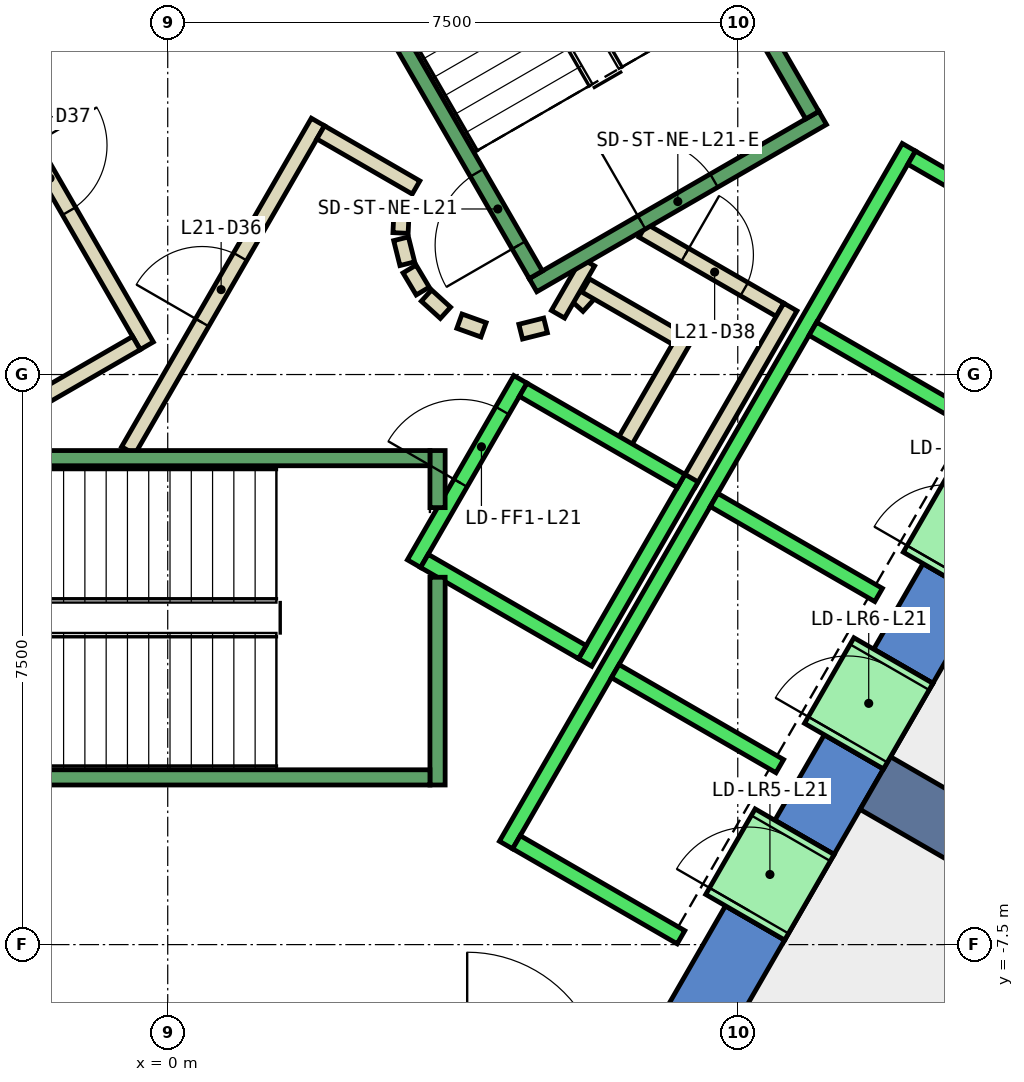
"""IFC4 building model, lengths in metres.
Left out: names, types, materials, properties, quantities, classifications, styles, units other than length and angle.
Written with IfcOpenShell. Run it as: python <this file> out.ifc"""

import sys

from ifc_helpers import new_model, si_unit, direction, frame, frame_2d, origin, place, context, subcontext, project, spatial, polyline, rectangle, outline, extrude, element, fill, save


model = new_model("IFC4")
c1 = context("Model", 3, precision=1e-05, world=origin(), true_north=direction((0.0, 1.0)))
c2 = subcontext(c1, "Body", "Model", "MODEL_VIEW")
j1 = project(units=[si_unit("LENGTHUNIT", "METRE"), si_unit("PLANEANGLEUNIT", "RADIAN")], contexts=[c1])
p1 = place(None, origin())
s1 = spatial("IfcSite", under=j1, at=p1, CompositionType="ELEMENT")
p2 = place(p1, origin())
s2 = spatial("IfcBuilding", under=s1, at=p2, CompositionType="ELEMENT")
p3 = place(p2, frame((0.0, 0.0, 99.2)))
s3 = spatial("IfcBuildingStorey", under=s2, at=p3, CompositionType="ELEMENT", Elevation=99.2)
p4 = place(p3, frame((0.0, 0.0, -0.4)))
e1 = element("IfcWall", 1, at=p4, inside=s3, PredefinedType="SHEAR", context=c2, shape_type="SweptSolid", body=[
    extrude(outline(polyline([(8.517, 11.748), (7.738, 11.298), (12.817, 2.5), (13.856, 2.5), (8.517, 11.748)])), origin(), (0.0, 0.0, 1.0), 4.2),
])
p5 = place(p3, frame((0.0, 0.0, -0.4)))
e2 = element("IfcWall", 2, at=p5, inside=s3, PredefinedType="SHEAR", context=c2, shape_type="SweptSolid", body=[
    extrude(outline(polyline([(8.117, -7.44), (7.338, -6.99), (6.409, -8.6), (6.928, -9.5), (8.117, -7.44)])), origin(), (0.0, 0.0, 1.0), 4.2),
])
p6 = place(p3, frame((0.0, 0.0, -0.4)))
e3 = element("IfcWall", 3, at=p6, inside=s3, PredefinedType="SHEAR", context=c2, shape_type="SweptSolid", body=[
    extrude(outline(polyline([(9.417, -5.189), (8.638, -4.739), (7.988, -5.864), (8.767, -6.314), (9.417, -5.189)])), origin(), (0.0, 0.0, 1.0), 4.2),
])
p7 = place(p3, frame((0.0, 0.0, -0.4)))
e4 = element("IfcWall", 4, at=p7, inside=s3, PredefinedType="SHEAR", context=c2, shape_type="SweptSolid", body=[
    extrude(outline(polyline([(10.717, -2.937), (9.938, -2.487), (9.288, -3.613), (10.067, -4.063), (10.717, -2.937)])), origin(), (0.0, 0.0, 1.0), 4.2),
])
p8 = place(p3, frame((0.0, 0.0, 3.6)))
e5 = element("IfcWall", 5, at=p8, inside=s3, PredefinedType="SHEAR", context=c2, shape_type="SweptSolid", body=[
    extrude(outline(polyline([(8.767, -6.314), (7.988, -5.864), (7.338, -6.99), (8.117, -7.44), (8.767, -6.314)])), origin(), (0.0, 0.0, 1.0), 0.2),
])
p9 = place(p3, frame((0.0, 0.0, 3.6)))
e6 = element("IfcWall", 6, at=p9, inside=s3, PredefinedType="SHEAR", context=c2, shape_type="SweptSolid", body=[
    extrude(outline(polyline([(10.067, -4.063), (9.288, -3.613), (8.638, -4.739), (9.417, -5.189), (10.067, -4.063)])), origin(), (0.0, 0.0, 1.0), 0.2),
])
p10 = place(p3, frame((0.0, 0.0, 3.6)))
e7 = element("IfcWall", 7, at=p10, inside=s3, PredefinedType="SHEAR", context=c2, shape_type="SweptSolid", body=[
    extrude(outline(polyline([(11.367, -1.811), (10.588, -1.361), (9.938, -2.487), (10.717, -2.937), (11.367, -1.811)])), origin(), (0.0, 0.0, 1.0), 0.2),
])
p11 = place(p3, frame((9.31, -5.375, -0.4), z_axis=(0.0, 0.0, 1.0), x_axis=(0.866017533419, -0.500013631625, 0.0)))
e8 = element("IfcWall", 8, at=p11, inside=s3, PredefinedType="SHEAR", context=c2, shape_type="SweptSolid", body=[
    extrude(rectangle(XDim=9.0, YDim=0.8, at=frame_2d((4.5, 0.0))), origin(), (0.0, 0.0, 1.0), 4.2),
])
p12 = place(p3, frame((5.39, 0.898, 0.0), z_axis=(0.0, 0.0, 1.0), x_axis=(0.673828488714, 0.738887791073, 0.0)))
e9 = element("IfcWall", 9, at=p12, inside=s3, PredefinedType="PARTITIONING", context=c2, shape_type="SweptSolid", body=[
    extrude(rectangle(XDim=0.263, YDim=0.2, at=frame_2d((0.131, 0.0))), origin(), (0.0, 0.0, 1.0), 3.8),
])
p13 = place(p3, frame((5.499, 1.172, 0.0), z_axis=(0.0, 0.0, 1.0), x_axis=(0.866333505267, -0.499465972466, 0.0)))
e10 = element("IfcWall", 10, at=p13, inside=s3, PredefinedType="PARTITIONING", context=c2, shape_type="SweptSolid", body=[
    extrude(rectangle(XDim=1.374, YDim=0.2, at=frame_2d((0.687, 0.0))), origin(), (0.0, 0.0, 1.0), 3.8),
])
p14 = place(p3, frame((6.826, 0.522, 0.0), z_axis=(0.0, 0.0, 1.0), x_axis=(-0.500016722714, -0.866015748706, 0.0)))
e11 = element("IfcWall", 11, at=p14, inside=s3, PredefinedType="PARTITIONING", context=c2, shape_type="SweptSolid", body=[
    extrude(rectangle(XDim=1.7, YDim=0.2, at=frame_2d((0.85, 0.0))), origin(), (0.0, 0.0, 1.0), 3.8),
])
p15 = place(p3, frame((6.25, 1.894, 0.0), z_axis=(0.0, 0.0, 1.0), x_axis=(0.866043184279, -0.499969202016, 0.0)))
e12 = element("IfcWall", 12, at=p15, inside=s3, PredefinedType="PARTITIONING", context=c2, shape_type="SweptSolid", body=[
    extrude(rectangle(XDim=2.084, YDim=0.2, at=frame_2d((1.042, 0.0))), origin(), (0.0, 0.0, 1.0), 3.8),
])
p16 = place(p15, frame((0.642, 0.0, 0.0)))
e13 = element("IfcOpeningElement", 13, at=p16, cuts=e12, PredefinedType="OPENING", context=c2, shape_type="SweptSolid", body=[
    extrude(rectangle(XDim=0.9, YDim=2.1, at=frame_2d((0.45, 1.05))), frame((0.0, 0.11, 0.0), z_axis=(0.0, -1.0, 0.0), x_axis=(1.0, 0.0, 0.0)), (0.0, 0.0, 1.0), 0.22),
])
p17 = place(p3, frame((8.192, 0.888, 0.0), z_axis=(0.0, 0.0, 1.0), x_axis=(-0.499940625693, -0.866059680843, 0.0)))
e14 = element("IfcWall", 14, at=p17, inside=s3, PredefinedType="PARTITIONING", context=c2, shape_type="SweptSolid", body=[
    extrude(rectangle(XDim=2.68, YDim=0.2, at=frame_2d((1.34, 0.0))), origin(), (0.0, 0.0, 1.0), 3.8),
])
p18 = place(p3, frame((5.135, 0.793, 0.0), z_axis=(0.0, 0.0, 1.0), x_axis=(0.499526442893, 0.866298639529, 0.0)))
e15 = element("IfcWall", 15, at=p18, inside=s3, PredefinedType="PARTITIONING", context=c2, shape_type="SweptSolid", body=[
    extrude(rectangle(XDim=0.791, YDim=0.2, at=frame_2d((0.396, 0.0))), origin(), (0.0, 0.0, 1.0), 3.8),
])
p19 = place(p3, frame((-0.52, -1.0, 0.0), z_axis=(0.0, 0.0, 1.0), x_axis=(0.50011622646, 0.865958290007, 0.0)))
e16 = element("IfcWall", 16, at=p19, inside=s3, PredefinedType="PARTITIONING", context=c2, shape_type="SweptSolid", body=[
    extrude(rectangle(XDim=4.991, YDim=0.2, at=frame_2d((2.496, 0.0))), origin(), (0.0, 0.0, 1.0), 3.8),
])
p20 = place(p19, frame((1.945, 0.0, 0.0)))
e17 = element("IfcOpeningElement", 17, at=p20, cuts=e16, PredefinedType="OPENING", context=c2, shape_type="SweptSolid", body=[
    extrude(rectangle(XDim=1.0, YDim=2.1, at=frame_2d((0.5, 1.05))), frame((0.0, 0.11, 0.0), z_axis=(0.0, -1.0, 0.0), x_axis=(1.0, 0.0, 0.0)), (0.0, 0.0, 1.0), 0.22),
])
p21 = place(p3, frame((2.012, 3.186, 0.0), z_axis=(0.0, 0.0, 1.0), x_axis=(0.865891012941, -0.500232699559, 0.0)))
e18 = element("IfcWall", 18, at=p21, inside=s3, PredefinedType="PARTITIONING", context=c2, shape_type="SweptSolid", body=[
    extrude(rectangle(XDim=1.449, YDim=0.2, at=frame_2d((0.725, 0.0))), origin(), (0.0, 0.0, 1.0), 3.8),
])
p22 = place(p3, frame((3.079, 2.199, 0.0), z_axis=(0.0, 0.0, 1.0), x_axis=(-0.047771483479, -0.998858290933, 0.0)))
e19 = element("IfcWall", 19, at=p22, inside=s3, PredefinedType="PARTITIONING", context=c2, shape_type="SweptSolid", body=[
    extrude(rectangle(XDim=0.337, YDim=0.2, at=frame_2d((0.169, 0.0))), origin(), (0.0, 0.0, 1.0), 3.8),
])
p23 = place(p3, frame((3.07, 1.786, 0.0), z_axis=(0.0, 0.0, 1.0), x_axis=(0.242705583207, -0.970099994784, 0.0)))
e20 = element("IfcWall", 20, at=p23, inside=s3, PredefinedType="PARTITIONING", context=c2, shape_type="SweptSolid", body=[
    extrude(rectangle(XDim=0.338, YDim=0.2, at=frame_2d((0.169, 0.0))), origin(), (0.0, 0.0, 1.0), 3.8),
])
for number, where, z_axis, x_axis in (
    (21, (3.182, 1.388, 0.0), (0.0, 0.0, 1.0), (0.512, -0.859, 0.0)),
    (22, (3.404, 1.039, 0.0), (0.0, 0.0, 1.0), (0.74, -0.672, 0.0)),
):
    element("IfcWall", number, at=place(p3, frame(where, z_axis=z_axis, x_axis=x_axis)), inside=s3, PredefinedType="PARTITIONING", context=c2, shape_type="SweptSolid", body=[
        extrude(rectangle(XDim=0.338, YDim=0.2, at=frame_2d((0.169, 0.0))), origin(), (0.0, 0.0, 1.0), 3.8),
    ])
p24 = place(p3, frame((3.838, 0.702, 0.0), z_axis=(0.0, 0.0, 1.0), x_axis=(0.941035081519, -0.338308993895, 0.0)))
e23 = element("IfcWall", 23, at=p24, inside=s3, PredefinedType="PARTITIONING", context=c2, shape_type="SweptSolid", body=[
    extrude(rectangle(XDim=0.337, YDim=0.2, at=frame_2d((0.168, 0.0))), origin(), (0.0, 0.0, 1.0), 3.8),
])
p25 = place(p3, frame((4.644, 0.564, 0.0), z_axis=(0.0, 0.0, 1.0), x_axis=(0.969929076366, 0.243387729394, 0.0)))
e24 = element("IfcWall", 24, at=p25, inside=s3, PredefinedType="PARTITIONING", context=c2, shape_type="SweptSolid", body=[
    extrude(rectangle(XDim=0.337, YDim=0.2, at=frame_2d((0.168, 0.0))), origin(), (0.0, 0.0, 1.0), 3.8),
])
p26 = place(p3, frame((-2.771, 4.7, 0.0), z_axis=(0.0, 0.0, 1.0), x_axis=(0.499969479948, -0.866043023828, 0.0)))
e25 = element("IfcWall", 25, at=p26, inside=s3, PredefinedType="PARTITIONING", context=c2, shape_type="SweptSolid", body=[
    extrude(rectangle(XDim=4.99, YDim=0.2, at=frame_2d((2.495, 0.0))), origin(), (0.0, 0.0, 1.0), 3.8),
])
p27 = place(p26, frame((1.945, 0.0, 0.0)))
e26 = element("IfcOpeningElement", 26, at=p27, cuts=e25, PredefinedType="OPENING", context=c2, shape_type="SweptSolid", body=[
    extrude(rectangle(XDim=1.0, YDim=2.1, at=frame_2d((0.5, 1.05))), frame((0.0, 0.11, 0.0), z_axis=(0.0, -1.0, 0.0), x_axis=(1.0, 0.0, 0.0)), (0.0, 0.0, 1.0), 0.22),
])
p28 = place(p3, frame((-0.412, 0.414, 0.0), z_axis=(0.0, 0.0, 1.0), x_axis=(-0.866017369001, -0.500013916395, 0.0)))
e27 = element("IfcWall", 27, at=p28, inside=s3, PredefinedType="PARTITIONING", context=c2, shape_type="SweptSolid", body=[
    extrude(rectangle(XDim=1.45, YDim=0.2, at=frame_2d((0.725, 0.0))), origin(), (0.0, 0.0, 1.0), 3.8),
])
p29 = place(p3, frame((12.401, -7.621, 0.0), z_axis=(0.0, 0.0, 1.0), x_axis=(-0.499983724212, -0.866034800411, 0.0)))
e28 = element("IfcWall", 28, at=p29, inside=s3, PredefinedType="PARTITIONING", context=c2, shape_type="SweptSolid", body=[
    extrude(rectangle(XDim=9.302, YDim=0.2, at=frame_2d((4.651, 0.0))), origin(), (0.0, 0.0, 1.0), 3.8),
])
p30 = place(p3, frame((3.24, -2.488, 0.0), z_axis=(0.0, 0.0, 1.0), x_axis=(0.49994636267, 0.866056369097, 0.0)))
e29 = element("IfcWall", 29, at=p30, inside=s3, PredefinedType="STANDARD", context=c2, shape_type="SweptSolid", body=[
    extrude(rectangle(XDim=2.8, YDim=0.2, at=frame_2d((1.4, 0.0))), origin(), (0.0, 0.0, 1.0), 3.8),
])
p31 = place(p30, frame((1.225, 0.0, 0.0)))
e30 = element("IfcOpeningElement", 30, at=p31, cuts=e29, PredefinedType="OPENING", context=c2, shape_type="SweptSolid", body=[
    extrude(rectangle(XDim=1.1, YDim=2.1, at=frame_2d((0.55, 1.05))), frame((0.0, 0.11, 0.0), z_axis=(0.0, -1.0, 0.0), x_axis=(1.0, 0.0, 0.0)), (0.0, 0.0, 1.0), 0.22),
])
p32 = place(p3, frame((5.492, -3.788, 0.0), z_axis=(0.0, 0.0, 1.0), x_axis=(0.500011755427, 0.866018616679, 0.0)))
e31 = element("IfcWall", 31, at=p32, inside=s3, PredefinedType="STANDARD", context=c2, shape_type="SweptSolid", body=[
    extrude(rectangle(XDim=2.8, YDim=0.2, at=frame_2d((1.4, 0.0))), origin(), (0.0, 0.0, 1.0), 3.8),
])
p33 = place(p3, frame((3.377, -2.452, 0.0), z_axis=(0.0, 0.0, 1.0), x_axis=(0.865955154139, -0.50012165622, 0.0)))
e32 = element("IfcWall", 32, at=p33, inside=s3, PredefinedType="STANDARD", context=c2, shape_type="SweptSolid", body=[
    extrude(rectangle(XDim=2.4, YDim=0.2, at=frame_2d((1.2, 0.0))), origin(), (0.0, 0.0, 1.0), 3.8),
])
p34 = place(p3, frame((4.677, -0.2, 0.0), z_axis=(0.0, 0.0, 1.0), x_axis=(0.865973769406, -0.500089422704, 0.0)))
e33 = element("IfcWall", 33, at=p34, inside=s3, PredefinedType="STANDARD", context=c2, shape_type="SweptSolid", body=[
    extrude(rectangle(XDim=2.399, YDim=0.2, at=frame_2d((1.2, 0.0))), origin(), (0.0, 0.0, 1.0), 3.8),
])
p35 = place(p3, frame((4.451, -6.19, 0.0), z_axis=(0.0, 0.0, 1.0), x_axis=(0.50000090737, 0.866024879913, 0.0)))
e34 = element("IfcWall", 34, at=p35, inside=s3, PredefinedType="STANDARD", context=c2, shape_type="SweptSolid", body=[
    extrude(rectangle(XDim=10.6, YDim=0.2, at=frame_2d((5.3, 0.0))), origin(), (0.0, 0.0, 1.0), 3.8),
])
for number, where, z_axis, x_axis in (
    (35, (4.588, -6.153, 0.0), (0.0, 0.0, 1.0), (0.866, -0.5, 0.0)),
    (36, (5.888, -3.902, 0.0), (0.0, 0.0, 1.0), (0.866, -0.5, 0.0)),
    (37, (7.188, -1.65, 0.0), (0.0, 0.0, 1.0), (0.866, -0.5, 0.0)),
    (38, (8.488, 0.602, 0.0), (0.0, 0.0, 1.0), (0.866, -0.5, 0.0)),
):
    element("IfcWall", number, at=place(p3, frame(where, z_axis=z_axis, x_axis=x_axis)), inside=s3, PredefinedType="STANDARD", context=c2, shape_type="SweptSolid", body=[
        extrude(rectangle(XDim=2.5, YDim=0.2, at=frame_2d((1.25, 0.0))), origin(), (0.0, 0.0, 1.0), 3.8),
    ])
p36 = place(p3, frame((9.788, 2.853, 0.0), z_axis=(0.0, 0.0, 1.0), x_axis=(0.865998541277, -0.500046524342, 0.0)))
e39 = element("IfcWall", 39, at=p36, inside=s3, PredefinedType="STANDARD", context=c2, shape_type="SweptSolid", body=[
    extrude(rectangle(XDim=2.5, YDim=0.2, at=frame_2d((1.25, 0.0))), origin(), (0.0, 0.0, 1.0), 3.8),
])
p37 = place(p3, frame((7.598, -7.14, 0.0), z_axis=(0.0, 0.0, 1.0), x_axis=(0.500362116554, 0.865816234728, 0.0)))
e40 = element("IfcWall", 40, at=p37, inside=s3, PredefinedType="STANDARD", context=c2, shape_type="SweptSolid", body=[
    extrude(rectangle(XDim=1.299, YDim=1.2, at=frame_2d((0.65, 0.0))), origin(), (0.0, 0.0, 1.0), 2.4),
])
p38 = place(p37, frame((0.1, 0.0, 0.0)))
e41 = element("IfcOpeningElement", 41, at=p38, cuts=e40, PredefinedType="OPENING", context=c2, shape_type="SweptSolid", body=[
    extrude(rectangle(XDim=1.1, YDim=2.3, at=frame_2d((0.55, 1.15))), frame((0.0, 0.61, 0.0), z_axis=(0.0, -1.0, 0.0), x_axis=(1.0, 0.0, 0.0)), (0.0, 0.0, 1.0), 1.22),
])
p39 = place(p3, frame((8.898, -4.889, 0.0), z_axis=(0.0, 0.0, 1.0), x_axis=(0.500036693733, 0.866004217611, 0.0)))
e42 = element("IfcWall", 42, at=p39, inside=s3, PredefinedType="STANDARD", context=c2, shape_type="SweptSolid", body=[
    extrude(rectangle(XDim=1.3, YDim=1.2, at=frame_2d((0.65, 0.0))), origin(), (0.0, 0.0, 1.0), 2.4),
])
p40 = place(p39, frame((0.1, 0.0, 0.0)))
e43 = element("IfcOpeningElement", 43, at=p40, cuts=e42, PredefinedType="OPENING", context=c2, shape_type="SweptSolid", body=[
    extrude(rectangle(XDim=1.1, YDim=2.3, at=frame_2d((0.55, 1.15))), frame((0.0, 0.61, 0.0), z_axis=(0.0, -1.0, 0.0), x_axis=(1.0, 0.0, 0.0)), (0.0, 0.0, 1.0), 1.22),
])
p41 = place(p3, frame((10.198, -2.637, 0.0), z_axis=(0.0, 0.0, 1.0), x_axis=(0.49989585183, 0.866085525409, 0.0)))
e44 = element("IfcWall", 44, at=p41, inside=s3, PredefinedType="STANDARD", context=c2, shape_type="SweptSolid", body=[
    extrude(rectangle(XDim=1.3, YDim=1.2, at=frame_2d((0.65, 0.0))), origin(), (0.0, 0.0, 1.0), 2.4),
])
p42 = place(p41, frame((0.1, 0.0, 0.0)))
e45 = element("IfcOpeningElement", 45, at=p42, cuts=e44, PredefinedType="OPENING", context=c2, shape_type="SweptSolid", body=[
    extrude(rectangle(XDim=1.1, YDim=2.3, at=frame_2d((0.55, 1.15))), frame((0.0, 0.61, 0.0), z_axis=(0.0, -1.0, 0.0), x_axis=(1.0, 0.0, 0.0)), (0.0, 0.0, 1.0), 1.22),
])
p43 = place(p3, frame((3.55, -2.667, 0.0), z_axis=(0.0, 0.0, 1.0), x_axis=(0.0, -1.0, 0.0)))
e46 = element("IfcWall", 46, at=p43, inside=s3, PredefinedType="STANDARD", context=c2, shape_type="SweptSolid", body=[
    extrude(rectangle(XDim=2.733, YDim=0.2, at=frame_2d((1.366, 0.0))), origin(), (0.0, 0.0, 1.0), 3.8),
])
p44 = place(p3, frame((3.55, -1.0, 0.0), z_axis=(0.0, 0.0, 1.0), x_axis=(0.0, -1.0, 0.0)))
e47 = element("IfcWall", 47, at=p44, inside=s3, PredefinedType="STANDARD", context=c2, shape_type="SweptSolid", body=[
    extrude(rectangle(XDim=0.751, YDim=0.2, at=frame_2d((0.375, 0.0))), origin(), (0.0, 0.0, 1.0), 3.8),
])
p45 = place(p3, frame((-3.45, -1.1, 0.0), z_axis=(0.0, 0.0, 1.0), x_axis=(1.0, 0.0, 0.0)))
e48 = element("IfcWall", 48, at=p45, inside=s3, PredefinedType="STANDARD", context=c2, shape_type="SweptSolid", body=[
    extrude(rectangle(XDim=6.9, YDim=0.2, at=frame_2d((3.45, 0.0))), origin(), (0.0, 0.0, 1.0), 3.8),
])
p46 = place(p45, frame((0.45, 0.0, 0.0)))
e49 = element("IfcOpeningElement", 49, at=p46, cuts=e48, PredefinedType="OPENING", context=c2, shape_type="SweptSolid", body=[
    extrude(rectangle(XDim=1.1, YDim=2.2, at=frame_2d((0.55, 1.1))), frame((0.0, 0.11, 0.0), z_axis=(0.0, -1.0, 0.0), x_axis=(1.0, 0.0, 0.0)), (0.0, 0.0, 1.0), 0.22),
])
p47 = place(p3, frame((-3.45, -5.3, 0.0), z_axis=(0.0, 0.0, 1.0), x_axis=(1.0, 0.0, 0.0)))
e50 = element("IfcWall", 50, at=p47, inside=s3, PredefinedType="STANDARD", context=c2, shape_type="SweptSolid", body=[
    extrude(rectangle(XDim=6.9, YDim=0.2, at=frame_2d((3.45, 0.0))), origin(), (0.0, 0.0, 1.0), 3.8),
])
p48 = place(p3, frame((4.806, 1.176, 0.0), z_axis=(0.0, 0.0, 1.0), x_axis=(0.866059941101, 0.499940174841, 0.0)))
e51 = element("IfcWall", 51, at=p48, inside=s3, PredefinedType="STANDARD", context=c2, shape_type="SweptSolid", body=[
    extrude(rectangle(XDim=4.4, YDim=0.2, at=frame_2d((2.2, 0.0))), origin(), (0.0, 0.0, 1.0), 3.8),
])
p49 = place(p48, frame((1.65, 0.0, 0.0)))
e52 = element("IfcOpeningElement", 52, at=p49, cuts=e51, PredefinedType="OPENING", context=c2, shape_type="SweptSolid", body=[
    extrude(rectangle(XDim=1.1, YDim=2.2, at=frame_2d((0.55, 1.1))), frame((0.0, 0.11, 0.0), z_axis=(0.0, -1.0, 0.0), x_axis=(1.0, 0.0, 0.0)), (0.0, 0.0, 1.0), 0.22),
])
p50 = place(p3, frame((4.843, 1.312, 0.0), z_axis=(0.0, 0.0, 1.0), x_axis=(-0.499963383562, 0.866046543262, 0.0)))
e53 = element("IfcWall", 53, at=p50, inside=s3, PredefinedType="STANDARD", context=c2, shape_type="SweptSolid", body=[
    extrude(rectangle(XDim=6.9, YDim=0.2, at=frame_2d((3.45, 0.0))), origin(), (0.0, 0.0, 1.0), 3.8),
])
p51 = place(p50, frame((0.45, 0.0, 0.0)))
e54 = element("IfcOpeningElement", 54, at=p51, cuts=e53, PredefinedType="OPENING", context=c2, shape_type="SweptSolid", body=[
    extrude(rectangle(XDim=1.1, YDim=2.2, at=frame_2d((0.55, 1.1))), frame((0.0, 0.11, 0.0), z_axis=(0.0, -1.0, 0.0), x_axis=(1.0, 0.0, 0.0)), (0.0, 0.0, 1.0), 0.22),
])
p52 = place(p3, frame((8.48, 3.412, 0.0), z_axis=(0.0, 0.0, 1.0), x_axis=(-0.499978703459, 0.866037698999, 0.0)))
e55 = element("IfcWall", 55, at=p52, inside=s3, PredefinedType="STANDARD", context=c2, shape_type="SweptSolid", body=[
    extrude(rectangle(XDim=6.9, YDim=0.2, at=frame_2d((3.45, 0.0))), origin(), (0.0, 0.0, 1.0), 3.8),
])
p53 = place(p3, frame((-1.393, 7.288, 0.0), z_axis=(0.0, 0.0, 1.0), x_axis=(-0.499963383562, -0.866046543262, 0.0)))
e56 = element("IfcWall", 56, at=p53, inside=s3, PredefinedType="STANDARD", context=c2, shape_type="SweptSolid", body=[
    extrude(rectangle(XDim=6.9, YDim=0.2, at=frame_2d((3.45, 0.0))), origin(), (0.0, 0.0, 1.0), 3.8),
])
p54 = place(p53, frame((0.45, 0.0, 0.0)))
e57 = element("IfcOpeningElement", 57, at=p54, cuts=e56, PredefinedType="OPENING", context=c2, shape_type="SweptSolid", body=[
    extrude(rectangle(XDim=1.1, YDim=2.2, at=frame_2d((0.55, 1.1))), frame((0.0, 0.11, 0.0), z_axis=(0.0, -1.0, 0.0), x_axis=(1.0, 0.0, 0.0)), (0.0, 0.0, 1.0), 0.22),
])
p55 = place(p20, origin())
e58 = element("IfcDoor", 58, at=p55, inside=s3, OperationType="SINGLE_SWING_LEFT", PredefinedType="DOOR", context=c2, shape_type="SweptSolid", body=[
    extrude(rectangle(XDim=1.0, YDim=2.1, at=frame_2d((0.5, 1.05))), frame((0.0, 0.025, 0.0), z_axis=(0.0, -1.0, 0.0), x_axis=(1.0, 0.0, 0.0)), (0.0, 0.0, 1.0), 0.05),
])
fill(e17, e58)
p56 = place(p27, origin())
e59 = element("IfcDoor", 59, at=p56, inside=s3, OperationType="SINGLE_SWING_RIGHT", PredefinedType="DOOR", context=c2, shape_type="SweptSolid", body=[
    extrude(rectangle(XDim=1.0, YDim=2.1, at=frame_2d((0.5, 1.05))), frame((0.0, 0.025, 0.0), z_axis=(0.0, -1.0, 0.0), x_axis=(1.0, 0.0, 0.0)), (0.0, 0.0, 1.0), 0.05),
])
fill(e26, e59)
p57 = place(p16, origin())
e60 = element("IfcDoor", 60, at=p57, inside=s3, OperationType="SINGLE_SWING_LEFT", PredefinedType="DOOR", context=c2, shape_type="SweptSolid", body=[
    extrude(rectangle(XDim=0.9, YDim=2.1, at=frame_2d((0.45, 1.05))), frame((0.0, 0.025, 0.0), z_axis=(0.0, -1.0, 0.0), x_axis=(1.0, 0.0, 0.0)), (0.0, 0.0, 1.0), 0.05),
])
fill(e13, e60)
p58 = place(p38, origin())
e61 = element("IfcDoor", 61, at=p58, inside=s3, OperationType="SLIDING_TO_LEFT", PredefinedType="DOOR", context=c2, shape_type="SweptSolid", body=[
    extrude(rectangle(XDim=1.1, YDim=2.3, at=frame_2d((0.55, 1.15))), frame((0.0, 0.025, 0.0), z_axis=(0.0, -1.0, 0.0), x_axis=(1.0, 0.0, 0.0)), (0.0, 0.0, 1.0), 0.05),
])
fill(e41, e61)
p59 = place(p40, origin())
e62 = element("IfcDoor", 62, at=p59, inside=s3, OperationType="SLIDING_TO_LEFT", PredefinedType="DOOR", context=c2, shape_type="SweptSolid", body=[
    extrude(rectangle(XDim=1.1, YDim=2.3, at=frame_2d((0.55, 1.15))), frame((0.0, 0.025, 0.0), z_axis=(0.0, -1.0, 0.0), x_axis=(1.0, 0.0, 0.0)), (0.0, 0.0, 1.0), 0.05),
])
fill(e43, e62)
p60 = place(p31, origin())
e63 = element("IfcDoor", 63, at=p60, inside=s3, OperationType="SLIDING_TO_LEFT", PredefinedType="DOOR", context=c2, shape_type="SweptSolid", body=[
    extrude(rectangle(XDim=1.1, YDim=2.1, at=frame_2d((0.55, 1.05))), frame((0.0, 0.025, 0.0), z_axis=(0.0, -1.0, 0.0), x_axis=(1.0, 0.0, 0.0)), (0.0, 0.0, 1.0), 0.05),
])
fill(e30, e63)
p61 = place(p51, origin())
e64 = element("IfcDoor", 64, at=p61, inside=s3, OperationType="SINGLE_SWING_LEFT", PredefinedType="DOOR", context=c2, shape_type="SweptSolid", body=[
    extrude(rectangle(XDim=1.1, YDim=2.2, at=frame_2d((0.55, 1.1))), frame((0.0, 0.025, 0.0), z_axis=(0.0, -1.0, 0.0), x_axis=(1.0, 0.0, 0.0)), (0.0, 0.0, 1.0), 0.05),
])
fill(e54, e64)
p62 = place(p49, origin())
e65 = element("IfcDoor", 65, at=p62, inside=s3, OperationType="SINGLE_SWING_LEFT", PredefinedType="DOOR", context=c2, shape_type="SweptSolid", body=[
    extrude(rectangle(XDim=1.1, YDim=2.2, at=frame_2d((0.55, 1.1))), frame((0.0, 0.025, 0.0), z_axis=(0.0, -1.0, 0.0), x_axis=(1.0, 0.0, 0.0)), (0.0, 0.0, 1.0), 0.05),
])
fill(e52, e65)
save(model, sys.argv[1])
